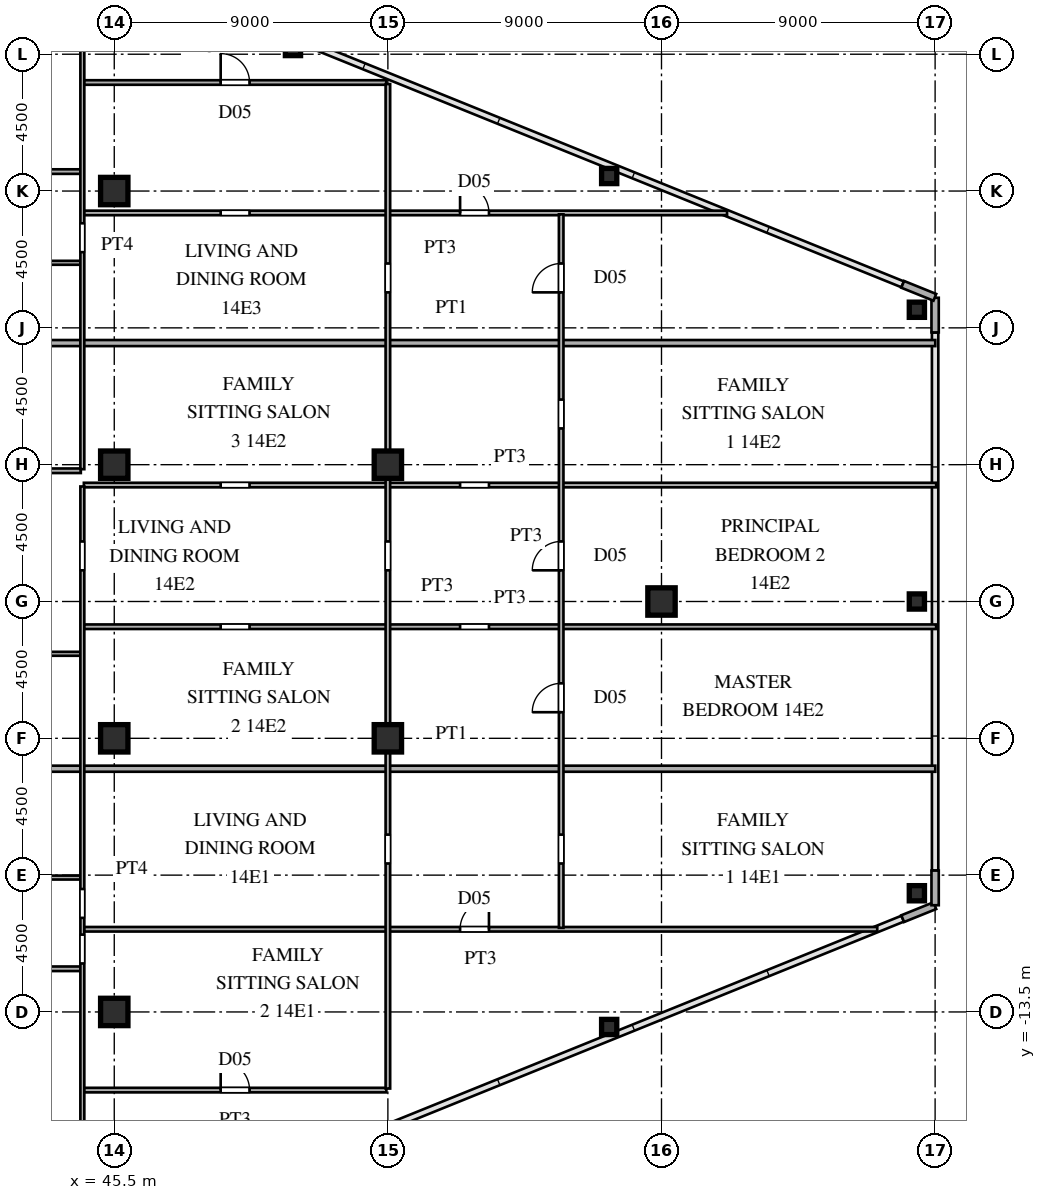
"""IFC4 building model, lengths in metres.
Left out: names, types, materials, properties, quantities, classifications, styles, units other than length and angle.
Written with IfcOpenShell. Run it as: python <this file> out.ifc"""

import sys

from ifc_helpers import new_model, si_unit, direction, frame, frame_2d, origin, origin_2d, place, context, subcontext, project, spatial, rectangle, hollow_rectangle, i_section, extrude, source, transform, mapped, element, fill, save


model = new_model("IFC4")
c1 = context("Model", 3, precision=1e-05, world=origin(), true_north=direction((0.0, 1.0)))
c2 = subcontext(c1, "Body", "Model", "MODEL_VIEW")
j1 = project(units=[si_unit("LENGTHUNIT", "METRE"), si_unit("PLANEANGLEUNIT", "RADIAN")], contexts=[c1])
p1 = place(None, origin())
s1 = spatial("IfcSite", under=j1, at=p1, CompositionType="ELEMENT")
p2 = place(p1, origin())
s2 = spatial("IfcBuilding", under=s1, at=p2, CompositionType="ELEMENT")
p3 = place(p2, frame((0.0, 0.0, 54.9)))
s3 = spatial("IfcBuildingStorey", under=s2, at=p3, CompositionType="ELEMENT", Elevation=54.9)
m1 = source(origin(), c2, "Body", "SweptSolid", [
    extrude(i_section(OverallWidth=0.9, OverallDepth=0.9, WebThickness=0.036, FlangeThickness=0.055, at=origin_2d()), origin(), (0.0, 0.0, 1.0), 3.6),
])
for number, where, z_axis, x_axis in (
    (1, (45.5, -13.5, 0.0), (0.0, 0.0, 1.0), (1.0, 0.0, 0.0)),
    (2, (45.5, -4.5, 0.0), (0.0, 0.0, 1.0), (1.0, 0.0, 0.0)),
    (3, (45.5, 4.5, 0.0), (0.0, 0.0, 1.0), (1.0, 0.0, 0.0)),
    (4, (45.5, 13.5, 0.0), (0.0, 0.0, 1.0), (1.0, 0.0, 0.0)),
    (5, (54.5, -4.5, 0.0), (0.0, 0.0, 1.0), (1.0, 0.0, 0.0)),
    (6, (54.5, 4.5, 0.0), (0.0, 0.0, 1.0), (1.0, 0.0, 0.0)),
    (7, (63.5, 0.0, 0.0), (0.0, 0.0, 1.0), (1.0, 0.0, 0.0)),
):
    element("IfcColumn", number, at=place(p3, frame(where, z_axis=z_axis, x_axis=x_axis)), inside=s3, PredefinedType="COLUMN", context=c2, shape_type="MappedRepresentation", body=[
        mapped(m1, transform((0.0, 0.0, 0.0), scale=1.0)),
    ])
m2 = source(origin(), c2, "Body", "SweptSolid", [
    extrude(hollow_rectangle(XDim=0.5, YDim=0.5, WallThickness=0.02, at=origin_2d()), origin(), (0.0, 0.0, 1.0), 3.6),
])
for number, where, z_axis, x_axis in (
    (8, (71.9, -9.596, 0.0), (0.0, 0.0, 1.0), (1.0, 0.0, 0.0)),
    (9, (71.9, 9.596, 0.0), (0.0, 0.0, 1.0), (1.0, 0.0, 0.0)),
    (10, (61.779, -13.994, 0.0), (0.0, 0.0, 1.0), (1.0, 0.0, 0.0)),
    (11, (51.378, 18.204, 0.0), (0.0, 0.0, 1.0), (1.0, 0.0, 0.0)),
    (12, (61.779, 13.994, 0.0), (0.0, 0.0, 1.0), (1.0, 0.0, 0.0)),
    (13, (71.9, 0.0, 0.0), (0.0, 0.0, 1.0), (1.0, 0.0, 0.0)),
):
    element("IfcColumn", number, at=place(p3, frame(where, z_axis=z_axis, x_axis=x_axis)), inside=s3, PredefinedType="COLUMN", context=c2, shape_type="MappedRepresentation", body=[
        mapped(m2, transform((0.0, 0.0, 0.0), scale=1.0)),
    ])
for number, where, z_axis, x_axis in (
    (14, (71.434, -10.431, 0.0), (0.0, 0.0, 1.0), (0.927, 0.375, 0.0)),
    (15, (72.5, -9.99, 0.0), (0.0, 0.0, 1.0), (0.0, 1.0, 0.0)),
    (16, (72.5, 8.85, 0.0), (0.0, 0.0, 1.0), (0.0, 1.0, 0.0)),
    (17, (72.491, 10.004, 0.0), (0.0, 0.0, 1.0), (-0.927, 0.375, 0.0)),
):
    element("IfcWall", number, at=place(p3, frame(where, z_axis=z_axis, x_axis=x_axis)), inside=s3, PredefinedType="SOLIDWALL", context=c2, shape_type="SweptSolid", body=[
        extrude(rectangle(XDim=1.14, YDim=0.24, at=frame_2d((0.57, 0.0))), origin(), (0.0, 0.0, 1.0), 3.38),
    ])
p4 = place(p3, frame((44.5, -16.07, 0.0), z_axis=(0.0, 0.0, 1.0), x_axis=(1.0, 0.0, 0.0)))
e18 = element("IfcWall", 18, at=p4, inside=s3, PredefinedType="PARTITIONING", context=c2, shape_type="SweptSolid", body=[
    extrude(rectangle(XDim=9.95, YDim=0.15, at=frame_2d((4.975, 0.0))), origin(), (0.0, 0.0, 1.0), 3.38),
])
p5 = place(p4, frame((4.5, 0.0, 0.0)))
e19 = element("IfcOpeningElement", 19, at=p5, cuts=e18, PredefinedType="OPENING", context=c2, shape_type="SweptSolid", body=[
    extrude(rectangle(XDim=0.95, YDim=2.15, at=frame_2d((0.475, 1.075))), frame((0.0, 0.085, 0.0), z_axis=(0.0, -1.0, 0.0), x_axis=(1.0, 0.0, 0.0)), (0.0, 0.0, 1.0), 0.17),
])
p6 = place(p3, frame((38.35, -12.08, 0.0), z_axis=(0.0, 0.0, 1.0), x_axis=(1.0, 0.0, 0.0)))
e20 = element("IfcWall", 20, at=p6, inside=s3, PredefinedType="PARTITIONING", context=c2, shape_type="SweptSolid", body=[
    extrude(rectangle(XDim=6.05, YDim=0.15, at=frame_2d((3.025, 0.0))), origin(), (0.0, 0.0, 1.0), 3.38),
])
p7 = place(p6, frame((2.55, 0.0, 0.0)))
e21 = element("IfcOpeningElement", 21, at=p7, cuts=e20, PredefinedType="OPENING", context=c2, shape_type="SweptSolid", body=[
    extrude(rectangle(XDim=0.95, YDim=2.15, at=frame_2d((0.475, 1.075))), frame((0.0, 0.085, 0.0), z_axis=(0.0, -1.0, 0.0), x_axis=(1.0, 0.0, 0.0)), (0.0, 0.0, 1.0), 0.17),
])
p8 = place(p3, frame((44.5, -10.78, 0.0), z_axis=(0.0, 0.0, 1.0), x_axis=(1.0, 0.0, 0.0)))
e22 = element("IfcWall", 22, at=p8, inside=s3, PredefinedType="PARTITIONING", context=c2, shape_type="SweptSolid", body=[
    extrude(rectangle(XDim=26.097, YDim=0.15, at=frame_2d((13.048, 0.0))), origin(), (0.0, 0.0, 1.0), 3.38),
])
p9 = place(p8, frame((12.375, 0.0, 0.0)))
e23 = element("IfcOpeningElement", 23, at=p9, cuts=e22, PredefinedType="OPENING", context=c2, shape_type="SweptSolid", body=[
    extrude(rectangle(XDim=0.95, YDim=2.15, at=frame_2d((0.475, 1.075))), frame((0.0, 0.085, 0.0), z_axis=(0.0, -1.0, 0.0), x_axis=(1.0, 0.0, 0.0)), (0.0, 0.0, 1.0), 0.17),
])
p10 = place(p3, frame((38.35, -9.08, 0.0), z_axis=(0.0, 0.0, 1.0), x_axis=(1.0, 0.0, 0.0)))
e24 = element("IfcWall", 24, at=p10, inside=s3, PredefinedType="PARTITIONING", context=c2, shape_type="SweptSolid", body=[
    extrude(rectangle(XDim=6.05, YDim=0.13, at=frame_2d((3.025, 0.0))), origin(), (0.0, 0.0, 1.0), 3.38),
])
p11 = place(p10, frame((2.585, 0.0, 0.0)))
e25 = element("IfcOpeningElement", 25, at=p11, cuts=e24, PredefinedType="OPENING", context=c2, shape_type="SweptSolid", body=[
    extrude(rectangle(XDim=0.88, YDim=2.1, at=frame_2d((0.44, 1.05))), frame((0.0, 0.075, 0.0), z_axis=(0.0, -1.0, 0.0), x_axis=(1.0, 0.0, 0.0)), (0.0, 0.0, 1.0), 0.15),
])
p12 = place(p3, frame((38.38, -5.5, 0.0), z_axis=(0.0, 0.0, 1.0), x_axis=(1.0, 0.0, 0.0)))
e26 = element("IfcWall", 26, at=p12, inside=s3, PredefinedType="PARTITIONING", context=c2, shape_type="SweptSolid", body=[
    extrude(rectangle(XDim=34.125, YDim=0.2, at=frame_2d((17.062, 0.0))), origin(), (0.0, 0.0, 1.0), 3.38),
])
p13 = place(p3, frame((38.35, -1.72, 0.0), z_axis=(0.0, 0.0, 1.0), x_axis=(1.0, 0.0, 0.0)))
e27 = element("IfcWall", 27, at=p13, inside=s3, PredefinedType="PARTITIONING", context=c2, shape_type="SweptSolid", body=[
    extrude(rectangle(XDim=6.05, YDim=0.13, at=frame_2d((3.025, 0.0))), origin(), (0.0, 0.0, 1.0), 3.38),
])
p14 = place(p13, frame((2.585, 0.0, 0.0)))
e28 = element("IfcOpeningElement", 28, at=p14, cuts=e27, PredefinedType="OPENING", context=c2, shape_type="SweptSolid", body=[
    extrude(rectangle(XDim=0.88, YDim=2.1, at=frame_2d((0.44, 1.05))), frame((0.0, 0.075, 0.0), z_axis=(0.0, -1.0, 0.0), x_axis=(1.0, 0.0, 0.0)), (0.0, 0.0, 1.0), 0.15),
])
p15 = place(p3, frame((44.5, -0.83, 0.0), z_axis=(0.0, 0.0, 1.0), x_axis=(1.0, 0.0, 0.0)))
e29 = element("IfcWall", 29, at=p15, inside=s3, PredefinedType="PARTITIONING", context=c2, shape_type="SweptSolid", body=[
    extrude(rectangle(XDim=28.035, YDim=0.15, at=frame_2d((14.018, 0.0))), origin(), (0.0, 0.0, 1.0), 3.38),
])
p16 = place(p15, frame((4.5, 0.0, 0.0)))
e30 = element("IfcOpeningElement", 30, at=p16, cuts=e29, PredefinedType="OPENING", context=c2, shape_type="SweptSolid", body=[
    extrude(rectangle(XDim=0.95, YDim=2.15, at=frame_2d((0.475, 1.075))), frame((0.0, 0.085, 0.0), z_axis=(0.0, -1.0, 0.0), x_axis=(1.0, 0.0, 0.0)), (0.0, 0.0, 1.0), 0.17),
])
p17 = place(p15, frame((12.375, 0.0, 0.0)))
e31 = element("IfcOpeningElement", 31, at=p17, cuts=e29, PredefinedType="OPENING", context=c2, shape_type="SweptSolid", body=[
    extrude(rectangle(XDim=0.95, YDim=2.15, at=frame_2d((0.475, 1.075))), frame((0.0, 0.085, 0.0), z_axis=(0.0, -1.0, 0.0), x_axis=(1.0, 0.0, 0.0)), (0.0, 0.0, 1.0), 0.17),
])
p18 = place(p3, frame((44.5, 3.83, 0.0), z_axis=(0.0, 0.0, 1.0), x_axis=(1.0, 0.0, 0.0)))
e32 = element("IfcWall", 32, at=p18, inside=s3, PredefinedType="PARTITIONING", context=c2, shape_type="SweptSolid", body=[
    extrude(rectangle(XDim=28.035, YDim=0.15, at=frame_2d((14.018, 0.0))), origin(), (0.0, 0.0, 1.0), 3.38),
])
p19 = place(p18, frame((4.5, 0.0, 0.0)))
e33 = element("IfcOpeningElement", 33, at=p19, cuts=e32, PredefinedType="OPENING", context=c2, shape_type="SweptSolid", body=[
    extrude(rectangle(XDim=0.95, YDim=2.15, at=frame_2d((0.475, 1.075))), frame((0.0, 0.085, 0.0), z_axis=(0.0, -1.0, 0.0), x_axis=(1.0, 0.0, 0.0)), (0.0, 0.0, 1.0), 0.17),
])
p20 = place(p18, frame((12.375, 0.0, 0.0)))
e34 = element("IfcOpeningElement", 34, at=p20, cuts=e32, PredefinedType="OPENING", context=c2, shape_type="SweptSolid", body=[
    extrude(rectangle(XDim=0.95, YDim=2.15, at=frame_2d((0.475, 1.075))), frame((0.0, 0.085, 0.0), z_axis=(0.0, -1.0, 0.0), x_axis=(1.0, 0.0, 0.0)), (0.0, 0.0, 1.0), 0.17),
])
p21 = place(p3, frame((38.35, 4.3, 0.0), z_axis=(0.0, 0.0, 1.0), x_axis=(1.0, 0.0, 0.0)))
e35 = element("IfcWall", 35, at=p21, inside=s3, PredefinedType="PARTITIONING", context=c2, shape_type="SweptSolid", body=[
    extrude(rectangle(XDim=6.05, YDim=0.15, at=frame_2d((3.025, 0.0))), origin(), (0.0, 0.0, 1.0), 3.38),
])
p22 = place(p21, frame((2.55, 0.0, 0.0)))
e36 = element("IfcOpeningElement", 36, at=p22, cuts=e35, PredefinedType="OPENING", context=c2, shape_type="SweptSolid", body=[
    extrude(rectangle(XDim=0.95, YDim=2.15, at=frame_2d((0.475, 1.075))), frame((0.0, 0.085, 0.0), z_axis=(0.0, -1.0, 0.0), x_axis=(1.0, 0.0, 0.0)), (0.0, 0.0, 1.0), 0.17),
])
p23 = place(p3, frame((38.38, 8.5, 0.0), z_axis=(0.0, 0.0, 1.0), x_axis=(1.0, 0.0, 0.0)))
e37 = element("IfcWall", 37, at=p23, inside=s3, PredefinedType="PARTITIONING", context=c2, shape_type="SweptSolid", body=[
    extrude(rectangle(XDim=34.125, YDim=0.2, at=frame_2d((17.062, 0.0))), origin(), (0.0, 0.0, 1.0), 3.38),
])
p24 = place(p3, frame((38.35, 11.14, 0.0), z_axis=(0.0, 0.0, 1.0), x_axis=(1.0, 0.0, 0.0)))
e38 = element("IfcWall", 38, at=p24, inside=s3, PredefinedType="PARTITIONING", context=c2, shape_type="SweptSolid", body=[
    extrude(rectangle(XDim=6.05, YDim=0.13, at=frame_2d((3.025, 0.0))), origin(), (0.0, 0.0, 1.0), 3.38),
])
p25 = place(p24, frame((2.585, 0.0, 0.0)))
e39 = element("IfcOpeningElement", 39, at=p25, cuts=e38, PredefinedType="OPENING", context=c2, shape_type="SweptSolid", body=[
    extrude(rectangle(XDim=0.88, YDim=2.1, at=frame_2d((0.44, 1.05))), frame((0.0, 0.075, 0.0), z_axis=(0.0, -1.0, 0.0), x_axis=(1.0, 0.0, 0.0)), (0.0, 0.0, 1.0), 0.15),
])
p26 = place(p3, frame((44.5, 12.78, 0.0), z_axis=(0.0, 0.0, 1.0), x_axis=(1.0, 0.0, 0.0)))
e40 = element("IfcWall", 40, at=p26, inside=s3, PredefinedType="PARTITIONING", context=c2, shape_type="SweptSolid", body=[
    extrude(rectangle(XDim=21.156, YDim=0.15, at=frame_2d((10.578, 0.0))), origin(), (0.0, 0.0, 1.0), 3.38),
])
p27 = place(p26, frame((4.5, 0.0, 0.0)))
e41 = element("IfcOpeningElement", 41, at=p27, cuts=e40, PredefinedType="OPENING", context=c2, shape_type="SweptSolid", body=[
    extrude(rectangle(XDim=0.95, YDim=2.15, at=frame_2d((0.475, 1.075))), frame((0.0, 0.085, 0.0), z_axis=(0.0, -1.0, 0.0), x_axis=(1.0, 0.0, 0.0)), (0.0, 0.0, 1.0), 0.17),
])
p28 = place(p26, frame((12.375, 0.0, 0.0)))
e42 = element("IfcOpeningElement", 42, at=p28, cuts=e40, PredefinedType="OPENING", context=c2, shape_type="SweptSolid", body=[
    extrude(rectangle(XDim=0.95, YDim=2.15, at=frame_2d((0.475, 1.075))), frame((0.0, 0.085, 0.0), z_axis=(0.0, -1.0, 0.0), x_axis=(1.0, 0.0, 0.0)), (0.0, 0.0, 1.0), 0.17),
])
p29 = place(p3, frame((38.35, 14.14, 0.0), z_axis=(0.0, 0.0, 1.0), x_axis=(1.0, 0.0, 0.0)))
e43 = element("IfcWall", 43, at=p29, inside=s3, PredefinedType="PARTITIONING", context=c2, shape_type="SweptSolid", body=[
    extrude(rectangle(XDim=6.05, YDim=0.15, at=frame_2d((3.025, 0.0))), origin(), (0.0, 0.0, 1.0), 3.38),
])
p30 = place(p29, frame((2.55, 0.0, 0.0)))
e44 = element("IfcOpeningElement", 44, at=p30, cuts=e43, PredefinedType="OPENING", context=c2, shape_type="SweptSolid", body=[
    extrude(rectangle(XDim=0.95, YDim=2.15, at=frame_2d((0.475, 1.075))), frame((0.0, 0.085, 0.0), z_axis=(0.0, -1.0, 0.0), x_axis=(1.0, 0.0, 0.0)), (0.0, 0.0, 1.0), 0.17),
])
p31 = place(p3, frame((44.5, 17.07, 0.0), z_axis=(0.0, 0.0, 1.0), x_axis=(1.0, 0.0, 0.0)))
e45 = element("IfcWall", 45, at=p31, inside=s3, PredefinedType="PARTITIONING", context=c2, shape_type="SweptSolid", body=[
    extrude(rectangle(XDim=9.95, YDim=0.15, at=frame_2d((4.975, 0.0))), origin(), (0.0, 0.0, 1.0), 3.38),
])
p32 = place(p31, frame((4.5, 0.0, 0.0)))
e46 = element("IfcOpeningElement", 46, at=p32, cuts=e45, PredefinedType="OPENING", context=c2, shape_type="SweptSolid", body=[
    extrude(rectangle(XDim=0.95, YDim=2.15, at=frame_2d((0.475, 1.075))), frame((0.0, 0.085, 0.0), z_axis=(0.0, -1.0, 0.0), x_axis=(1.0, 0.0, 0.0)), (0.0, 0.0, 1.0), 0.17),
])
p33 = place(p3, frame((44.45, -21.389, 0.0), z_axis=(0.0, 0.0, 1.0), x_axis=(0.0, 1.0, 0.0)))
e47 = element("IfcWall", 47, at=p33, inside=s3, PredefinedType="PARTITIONING", context=c2, shape_type="SweptSolid", body=[
    extrude(rectangle(XDim=25.172, YDim=0.13, at=frame_2d((12.586, 0.0))), origin(), (0.0, 0.0, 1.0), 3.38),
])
p34 = place(p33, frame((10.983, 0.0, 0.0)))
e48 = element("IfcOpeningElement", 48, at=p34, cuts=e47, PredefinedType="OPENING", context=c2, shape_type="SweptSolid", body=[
    extrude(rectangle(XDim=0.95, YDim=2.15, at=frame_2d((0.475, 1.075))), frame((0.0, 0.075, 0.0), z_axis=(0.0, -1.0, 0.0), x_axis=(1.0, 0.0, 0.0)), (0.0, 0.0, 1.0), 0.15),
])
p35 = place(p33, frame((9.483, 0.0, 0.0)))
e49 = element("IfcOpeningElement", 49, at=p35, cuts=e47, PredefinedType="OPENING", context=c2, shape_type="SweptSolid", body=[
    extrude(rectangle(XDim=0.95, YDim=2.15, at=frame_2d((0.475, 1.075))), frame((0.0, 0.075, 0.0), z_axis=(0.0, -1.0, 0.0), x_axis=(1.0, 0.0, 0.0)), (0.0, 0.0, 1.0), 0.15),
])
p36 = place(p33, frame((22.414, 0.0, 0.0)))
e50 = element("IfcOpeningElement", 50, at=p36, cuts=e47, PredefinedType="OPENING", context=c2, shape_type="SweptSolid", body=[
    extrude(rectangle(XDim=0.95, YDim=2.15, at=frame_2d((0.475, 1.075))), frame((0.0, 0.075, 0.0), z_axis=(0.0, -1.0, 0.0), x_axis=(1.0, 0.0, 0.0)), (0.0, 0.0, 1.0), 0.15),
])
p37 = place(p3, frame((44.45, 4.352, 0.0), z_axis=(0.0, 0.0, 1.0), x_axis=(0.0, 1.0, 0.0)))
e51 = element("IfcWall", 51, at=p37, inside=s3, PredefinedType="PARTITIONING", context=c2, shape_type="SweptSolid", body=[
    extrude(rectangle(XDim=17.037, YDim=0.13, at=frame_2d((8.519, 0.0))), origin(), (0.0, 0.0, 1.0), 3.38),
])
p38 = place(p37, frame((7.138, 0.0, 0.0)))
e52 = element("IfcOpeningElement", 52, at=p38, cuts=e51, PredefinedType="OPENING", context=c2, shape_type="SweptSolid", body=[
    extrude(rectangle(XDim=0.95, YDim=2.15, at=frame_2d((0.475, 1.075))), frame((0.0, 0.075, 0.0), z_axis=(0.0, -1.0, 0.0), x_axis=(1.0, 0.0, 0.0)), (0.0, 0.0, 1.0), 0.15),
])
p39 = place(p37, frame((15.352, 0.0, 0.0)))
e53 = element("IfcOpeningElement", 53, at=p39, cuts=e51, PredefinedType="OPENING", context=c2, shape_type="SweptSolid", body=[
    extrude(rectangle(XDim=0.95, YDim=2.15, at=frame_2d((0.475, 1.075))), frame((0.0, 0.075, 0.0), z_axis=(0.0, -1.0, 0.0), x_axis=(1.0, 0.0, 0.0)), (0.0, 0.0, 1.0), 0.15),
])
p40 = place(p3, frame((54.5, -16.019, 0.0), z_axis=(0.0, 0.0, 1.0), x_axis=(0.0, 1.0, 0.0)))
e54 = element("IfcWall", 54, at=p40, inside=s3, PredefinedType="PARTITIONING", context=c2, shape_type="SweptSolid", body=[
    extrude(rectangle(XDim=33.038, YDim=0.15, at=frame_2d((16.519, 0.0))), origin(), (0.0, 0.0, 1.0), 2.68),
])
p41 = place(p40, frame((7.402, 0.0, 0.0)))
e55 = element("IfcOpeningElement", 55, at=p41, cuts=e54, PredefinedType="OPENING", context=c2, shape_type="SweptSolid", body=[
    extrude(rectangle(XDim=0.95, YDim=2.15, at=frame_2d((0.475, 1.075))), frame((0.0, 0.085, 0.0), z_axis=(0.0, -1.0, 0.0), x_axis=(1.0, 0.0, 0.0)), (0.0, 0.0, 1.0), 0.17),
])
p42 = place(p40, frame((17.044, 0.0, 0.0)))
e56 = element("IfcOpeningElement", 56, at=p42, cuts=e54, PredefinedType="OPENING", context=c2, shape_type="SweptSolid", body=[
    extrude(rectangle(XDim=0.95, YDim=2.15, at=frame_2d((0.475, 1.075))), frame((0.0, 0.085, 0.0), z_axis=(0.0, -1.0, 0.0), x_axis=(1.0, 0.0, 0.0)), (0.0, 0.0, 1.0), 0.17),
])
p43 = place(p40, frame((26.186, 0.0, 0.0)))
e57 = element("IfcOpeningElement", 57, at=p43, cuts=e54, PredefinedType="OPENING", context=c2, shape_type="SweptSolid", body=[
    extrude(rectangle(XDim=0.95, YDim=2.15, at=frame_2d((0.475, 1.075))), frame((0.0, 0.085, 0.0), z_axis=(0.0, -1.0, 0.0), x_axis=(1.0, 0.0, 0.0)), (0.0, 0.0, 1.0), 0.17),
])
p44 = place(p3, frame((60.2, -10.734, 0.0), z_axis=(0.0, 0.0, 1.0), x_axis=(0.0, 1.0, 0.0)))
e58 = element("IfcWall", 58, at=p44, inside=s3, PredefinedType="PARTITIONING", context=c2, shape_type="SweptSolid", body=[
    extrude(rectangle(XDim=23.468, YDim=0.15, at=frame_2d((11.734, 0.0))), origin(), (0.0, 0.0, 1.0), 3.38),
])
p45 = place(p44, frame((2.117, 0.0, 0.0)))
e59 = element("IfcOpeningElement", 59, at=p45, cuts=e58, PredefinedType="OPENING", context=c2, shape_type="SweptSolid", body=[
    extrude(rectangle(XDim=0.95, YDim=2.15, at=frame_2d((0.475, 1.075))), frame((0.0, 0.085, 0.0), z_axis=(0.0, -1.0, 0.0), x_axis=(1.0, 0.0, 0.0)), (0.0, 0.0, 1.0), 0.17),
])
p46 = place(p44, frame((7.092, 0.0, 0.0)))
e60 = element("IfcOpeningElement", 60, at=p46, cuts=e58, PredefinedType="OPENING", context=c2, shape_type="SweptSolid", body=[
    extrude(rectangle(XDim=0.95, YDim=2.15, at=frame_2d((0.475, 1.075))), frame((0.0, 0.085, 0.0), z_axis=(0.0, -1.0, 0.0), x_axis=(1.0, 0.0, 0.0)), (0.0, 0.0, 1.0), 0.17),
])
p47 = place(p44, frame((11.759, 0.0, 0.0)))
e61 = element("IfcOpeningElement", 61, at=p47, cuts=e58, PredefinedType="OPENING", context=c2, shape_type="SweptSolid", body=[
    extrude(rectangle(XDim=0.95, YDim=2.15, at=frame_2d((0.475, 1.075))), frame((0.0, 0.085, 0.0), z_axis=(0.0, -1.0, 0.0), x_axis=(1.0, 0.0, 0.0)), (0.0, 0.0, 1.0), 0.17),
])
p48 = place(p44, frame((16.426, 0.0, 0.0)))
e62 = element("IfcOpeningElement", 62, at=p48, cuts=e58, PredefinedType="OPENING", context=c2, shape_type="SweptSolid", body=[
    extrude(rectangle(XDim=0.95, YDim=2.15, at=frame_2d((0.475, 1.075))), frame((0.0, 0.085, 0.0), z_axis=(0.0, -1.0, 0.0), x_axis=(1.0, 0.0, 0.0)), (0.0, 0.0, 1.0), 0.17),
])
p49 = place(p44, frame((20.901, 0.0, 0.0)))
e63 = element("IfcOpeningElement", 63, at=p49, cuts=e58, PredefinedType="OPENING", context=c2, shape_type="SweptSolid", body=[
    extrude(rectangle(XDim=0.95, YDim=2.15, at=frame_2d((0.475, 1.075))), frame((0.0, 0.085, 0.0), z_axis=(0.0, -1.0, 0.0), x_axis=(1.0, 0.0, 0.0)), (0.0, 0.0, 1.0), 0.17),
])
m3 = source(origin(), c2, "Body", "SweptSolid", [
    extrude(rectangle(XDim=0.95, YDim=2.15, at=frame_2d((0.475, 1.075))), frame((0.0, 0.025, 0.0), z_axis=(0.0, -1.0, 0.0), x_axis=(1.0, 0.0, 0.0)), (0.0, 0.0, 1.0), 0.05),
])
p50 = place(p5, origin())
e64 = element("IfcDoor", 64, at=p50, inside=s3, OperationType="SINGLE_SWING_LEFT", PredefinedType="DOOR", context=c2, shape_type="MappedRepresentation", body=[
    mapped(m3, transform((0.0, 0.0, 0.0), scale=1.0)),
])
fill(e19, e64)
p51 = place(p9, origin())
e65 = element("IfcDoor", 65, at=p51, inside=s3, OperationType="SINGLE_SWING_RIGHT", PredefinedType="DOOR", context=c2, shape_type="MappedRepresentation", body=[
    mapped(m3, transform((0.0, 0.0, 0.0), scale=1.0)),
])
fill(e23, e65)
p52 = place(p28, origin())
e66 = element("IfcDoor", 66, at=p52, inside=s3, OperationType="SINGLE_SWING_LEFT", PredefinedType="DOOR", context=c2, shape_type="MappedRepresentation", body=[
    mapped(m3, transform((0.0, 0.0, 0.0), scale=1.0)),
])
fill(e42, e66)
p53 = place(p32, origin())
e67 = element("IfcDoor", 67, at=p53, inside=s3, OperationType="SINGLE_SWING_LEFT", PredefinedType="DOOR", context=c2, shape_type="MappedRepresentation", body=[
    mapped(m3, transform((0.0, 0.0, 0.0), scale=1.0)),
])
fill(e46, e67)
p54 = place(p46, origin())
e68 = element("IfcDoor", 68, at=p54, inside=s3, OperationType="SINGLE_SWING_LEFT", PredefinedType="DOOR", context=c2, shape_type="MappedRepresentation", body=[
    mapped(m3, transform((0.0, 0.0, 0.0), scale=1.0)),
])
fill(e60, e68)
p55 = place(p47, origin())
e69 = element("IfcDoor", 69, at=p55, inside=s3, OperationType="SINGLE_SWING_LEFT", PredefinedType="DOOR", context=c2, shape_type="MappedRepresentation", body=[
    mapped(m3, transform((0.0, 0.0, 0.0), scale=1.0)),
])
fill(e61, e69)
p56 = place(p49, origin())
e70 = element("IfcDoor", 70, at=p56, inside=s3, OperationType="SINGLE_SWING_LEFT", PredefinedType="DOOR", context=c2, shape_type="MappedRepresentation", body=[
    mapped(m3, transform((0.0, 0.0, 0.0), scale=1.0)),
])
fill(e63, e70)
save(model, sys.argv[1])
